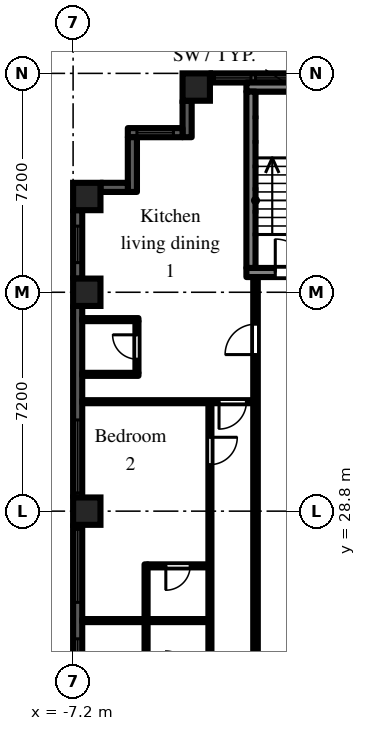
"""IFC4 building model, lengths in metres.
Left out: names, types, materials, properties, quantities, classifications, styles, units other than length and angle.
Written with IfcOpenShell. Run it as: python <this file> out.ifc"""

import sys

from ifc_helpers import new_model, si_unit, direction, frame, frame_2d, origin, origin_2d, place, context, subcontext, project, spatial, rectangle, extrude, element, fill, save


model = new_model("IFC4")
c1 = context("Model", 3, precision=1e-05, world=origin(), true_north=direction((0.0, 1.0)))
c2 = subcontext(c1, "Body", "Model", "MODEL_VIEW")
j1 = project(units=[si_unit("LENGTHUNIT", "METRE"), si_unit("PLANEANGLEUNIT", "RADIAN")], contexts=[c1])
p1 = place(None, origin())
s1 = spatial("IfcSite", under=j1, at=p1, CompositionType="ELEMENT")
p2 = place(p1, origin())
s2 = spatial("IfcBuilding", under=s1, at=p2, CompositionType="ELEMENT")
p3 = place(p2, frame((0.0, 0.0, 20.7)))
s3 = spatial("IfcBuildingStorey", under=s2, at=p3, CompositionType="ELEMENT", Elevation=20.7)
for number, where, z_axis, x_axis in (
    (1, (-6.75, 28.8, 0.0), (0.0, 0.0, 1.0), (1.0, 0.0, 0.0)),
    (2, (-6.75, 36.0, 0.0), (0.0, 0.0, 1.0), (1.0, 0.0, 0.0)),
    (3, (-6.75, 39.15, 0.0), (0.0, 0.0, 1.0), (1.0, 0.0, 0.0)),
    (4, (-3.15, 42.75, 0.0), (0.0, 0.0, 1.0), (1.0, 0.0, 0.0)),
):
    element("IfcColumn", number, at=place(p3, frame(where, z_axis=z_axis, x_axis=x_axis)), inside=s3, PredefinedType="COLUMN", context=c2, shape_type="SweptSolid", body=[
        extrude(rectangle(XDim=0.9, YDim=0.9, at=origin_2d()), origin(), (0.0, 0.0, 1.0), 3.0),
    ])
p4 = place(p3, frame((2.7, 43.05, 0.0), z_axis=(0.0, 0.0, 1.0), x_axis=(-1.0, 0.0, 0.0)))
e5 = element("IfcWall", 5, at=p4, inside=s3, PredefinedType="SOLIDWALL", context=c2, shape_type="SweptSolid", body=[
    extrude(rectangle(XDim=5.4, YDim=0.3, at=frame_2d((2.7, 0.0))), origin(), (0.0, 0.0, 1.0), 2.1),
])
p5 = place(p4, frame((1.5, 0.0, 0.2)))
e6 = element("IfcOpeningElement", 6, at=p5, cuts=e5, PredefinedType="OPENING", context=c2, shape_type="SweptSolid", body=[
    extrude(rectangle(XDim=2.4, YDim=1.85, at=frame_2d((1.2, 0.925))), frame((0.0, 0.16, 0.0), z_axis=(0.0, -1.0, 0.0), x_axis=(1.0, 0.0, 0.0)), (0.0, 0.0, 1.0), 0.32),
])
p6 = place(p4, frame((0.15, 0.0, 0.2)))
e7 = element("IfcOpeningElement", 7, at=p6, cuts=e5, PredefinedType="OPENING", context=c2, shape_type="SweptSolid", body=[
    extrude(rectangle(XDim=1.2, YDim=1.85, at=frame_2d((0.6, 0.925))), frame((0.0, 0.16, 0.0), z_axis=(0.0, -1.0, 0.0), x_axis=(1.0, 0.0, 0.0)), (0.0, 0.0, 1.0), 0.32),
])
p7 = place(p4, frame((4.05, 0.0, 0.2)))
e8 = element("IfcOpeningElement", 8, at=p7, cuts=e5, PredefinedType="OPENING", context=c2, shape_type="SweptSolid", body=[
    extrude(rectangle(XDim=1.2, YDim=1.85, at=frame_2d((0.6, 0.925))), frame((0.0, 0.16, 0.0), z_axis=(0.0, -1.0, 0.0), x_axis=(1.0, 0.0, 0.0)), (0.0, 0.0, 1.0), 0.32),
])
p8 = place(p3, frame((-3.45, 42.3, 0.0), z_axis=(0.0, 0.0, 1.0), x_axis=(0.0, -1.0, 0.0)))
e9 = element("IfcWall", 9, at=p8, inside=s3, PredefinedType="SOLIDWALL", context=c2, shape_type="SweptSolid", body=[
    extrude(rectangle(XDim=1.2, YDim=0.3, at=frame_2d((0.6, 0.0))), origin(), (0.0, 0.0, 1.0), 2.575),
])
p9 = place(p3, frame((-3.6, 41.25, 0.0), z_axis=(0.0, 0.0, 1.0), x_axis=(-1.0, 0.0, 0.0)))
e10 = element("IfcWall", 10, at=p9, inside=s3, PredefinedType="SOLIDWALL", context=c2, shape_type="SweptSolid", body=[
    extrude(rectangle(XDim=1.8, YDim=0.3, at=frame_2d((0.9, 0.0))), origin(), (0.0, 0.0, 1.0), 2.575),
])
p10 = place(p9, frame((0.3, 0.0, 0.2)))
e11 = element("IfcOpeningElement", 11, at=p10, cuts=e10, PredefinedType="OPENING", context=c2, shape_type="SweptSolid", body=[
    extrude(rectangle(XDim=1.2, YDim=1.85, at=frame_2d((0.6, 0.925))), frame((0.0, 0.16, 0.0), z_axis=(0.0, -1.0, 0.0), x_axis=(1.0, 0.0, 0.0)), (0.0, 0.0, 1.0), 0.32),
])
p11 = place(p3, frame((-5.25, 41.1, 0.0), z_axis=(0.0, 0.0, 1.0), x_axis=(0.0, -1.0, 0.0)))
e12 = element("IfcWall", 12, at=p11, inside=s3, PredefinedType="SOLIDWALL", context=c2, shape_type="SweptSolid", body=[
    extrude(rectangle(XDim=1.8, YDim=0.3, at=frame_2d((0.9, 0.0))), origin(), (0.0, 0.0, 1.0), 2.575),
])
p12 = place(p3, frame((-5.4, 39.45, 0.0), z_axis=(0.0, 0.0, 1.0), x_axis=(-1.0, 0.0, 0.0)))
e13 = element("IfcWall", 13, at=p12, inside=s3, PredefinedType="SOLIDWALL", context=c2, shape_type="SweptSolid", body=[
    extrude(rectangle(XDim=0.9, YDim=0.3, at=frame_2d((0.45, 0.0))), origin(), (0.0, 0.0, 1.0), 2.575),
])
p13 = place(p3, frame((-7.05, 38.7, 0.0), z_axis=(0.0, 0.0, 1.0), x_axis=(0.0, -1.0, 0.0)))
e14 = element("IfcWall", 14, at=p13, inside=s3, PredefinedType="SOLIDWALL", context=c2, shape_type="SweptSolid", body=[
    extrude(rectangle(XDim=2.25, YDim=0.3, at=frame_2d((1.125, 0.0))), origin(), (0.0, 0.0, 1.0), 2.1),
])
p14 = place(p13, frame((0.525, 0.0, 0.2)))
e15 = element("IfcOpeningElement", 15, at=p14, cuts=e14, PredefinedType="OPENING", context=c2, shape_type="SweptSolid", body=[
    extrude(rectangle(XDim=1.2, YDim=1.85, at=frame_2d((0.6, 0.925))), frame((0.0, 0.16, 0.0), z_axis=(0.0, -1.0, 0.0), x_axis=(1.0, 0.0, 0.0)), (0.0, 0.0, 1.0), 0.32),
])
p15 = place(p3, frame((-7.05, 35.55, 0.0), z_axis=(0.0, 0.0, 1.0), x_axis=(0.0, -1.0, 0.0)))
e16 = element("IfcWall", 16, at=p15, inside=s3, PredefinedType="SOLIDWALL", context=c2, shape_type="SweptSolid", body=[
    extrude(rectangle(XDim=6.3, YDim=0.3, at=frame_2d((3.15, 0.0))), origin(), (0.0, 0.0, 1.0), 2.1),
])
p16 = place(p15, frame((3.75, 0.0, 0.2)))
e17 = element("IfcOpeningElement", 17, at=p16, cuts=e16, PredefinedType="OPENING", context=c2, shape_type="SweptSolid", body=[
    extrude(rectangle(XDim=2.4, YDim=1.85, at=frame_2d((1.2, 0.925))), frame((0.0, 0.16, 0.0), z_axis=(0.0, -1.0, 0.0), x_axis=(1.0, 0.0, 0.0)), (0.0, 0.0, 1.0), 0.32),
])
p17 = place(p3, frame((-7.05, 28.35, 0.0), z_axis=(0.0, 0.0, 1.0), x_axis=(0.0, -1.0, 0.0)))
e18 = element("IfcWall", 18, at=p17, inside=s3, PredefinedType="SOLIDWALL", context=c2, shape_type="SweptSolid", body=[
    extrude(rectangle(XDim=6.3, YDim=0.3, at=frame_2d((3.15, 0.0))), origin(), (0.0, 0.0, 1.0), 2.1),
])
p18 = place(p17, frame((0.15, 0.0, 0.2)))
e19 = element("IfcOpeningElement", 19, at=p18, cuts=e18, PredefinedType="OPENING", context=c2, shape_type="SweptSolid", body=[
    extrude(rectangle(XDim=2.4, YDim=1.85, at=frame_2d((1.2, 0.925))), frame((0.0, 0.16, 0.0), z_axis=(0.0, -1.0, 0.0), x_axis=(1.0, 0.0, 0.0)), (0.0, 0.0, 1.0), 0.32),
])
p19 = place(p17, frame((3.75, 0.0, 0.2)))
e20 = element("IfcOpeningElement", 20, at=p19, cuts=e18, PredefinedType="OPENING", context=c2, shape_type="SweptSolid", body=[
    extrude(rectangle(XDim=2.4, YDim=1.85, at=frame_2d((1.2, 0.925))), frame((0.0, 0.16, 0.0), z_axis=(0.0, -1.0, 0.0), x_axis=(1.0, 0.0, 0.0)), (0.0, 0.0, 1.0), 0.32),
])
p20 = place(p3, frame((-1.5, 36.65, 0.0), z_axis=(0.0, 0.0, 1.0), x_axis=(1.0, 0.0, 0.0)))
e21 = element("IfcWall", 21, at=p20, inside=s3, PredefinedType="SHEAR", context=c2, shape_type="SweptSolid", body=[
    extrude(rectangle(XDim=3.0, YDim=0.3, at=frame_2d((1.5, 0.0))), origin(), (0.0, 0.0, 1.0), 2.575),
])
p21 = place(p20, frame((0.95, 0.0, 0.0)))
e22 = element("IfcOpeningElement", 22, at=p21, cuts=e21, PredefinedType="OPENING", context=c2, shape_type="SweptSolid", body=[
    extrude(rectangle(XDim=1.1, YDim=2.1, at=frame_2d((0.55, 1.05))), frame((0.0, 0.16, 0.0), z_axis=(0.0, -1.0, 0.0), x_axis=(1.0, 0.0, 0.0)), (0.0, 0.0, 1.0), 0.32),
])
p22 = place(p3, frame((-1.5, 42.75, 0.0), z_axis=(0.0, 0.0, 1.0), x_axis=(1.0, 0.0, 0.0)))
e23 = element("IfcWall", 23, at=p22, inside=s3, PredefinedType="SHEAR", context=c2, shape_type="SweptSolid", body=[
    extrude(rectangle(XDim=3.0, YDim=0.3, at=frame_2d((1.5, 0.0))), origin(), (0.0, 0.0, 1.0), 2.575),
])
p23 = place(p3, frame((-1.35, 36.8, 0.0), z_axis=(0.0, 0.0, 1.0), x_axis=(0.0, 1.0, 0.0)))
e24 = element("IfcWall", 24, at=p23, inside=s3, PredefinedType="SHEAR", context=c2, shape_type="SweptSolid", body=[
    extrude(rectangle(XDim=5.8, YDim=0.3, at=frame_2d((2.9, 0.0))), origin(), (0.0, 0.0, 1.0), 2.575),
])
p24 = place(p3, frame((-6.9, 25.2, 0.0), z_axis=(0.0, 0.0, 1.0), x_axis=(1.0, 0.0, 0.0)))
e25 = element("IfcWall", 25, at=p24, inside=s3, PredefinedType="PARTITIONING", context=c2, shape_type="SweptSolid", body=[
    extrude(rectangle(XDim=4.15, YDim=0.1, at=frame_2d((2.075, 0.0))), origin(), (0.0, 0.0, 1.0), 2.575),
])
p25 = place(p3, frame((-6.9, 32.4, 0.0), z_axis=(0.0, 0.0, 1.0), x_axis=(1.0, 0.0, 0.0)))
e26 = element("IfcWall", 26, at=p25, inside=s3, PredefinedType="PARTITIONING", context=c2, shape_type="SweptSolid", body=[
    extrude(rectangle(XDim=5.625, YDim=0.1, at=frame_2d((2.812, 0.0))), origin(), (0.0, 0.0, 1.0), 2.575),
])
p26 = place(p25, frame((4.5, 0.0, 0.0)))
e27 = element("IfcOpeningElement", 27, at=p26, cuts=e26, PredefinedType="OPENING", context=c2, shape_type="SweptSolid", body=[
    extrude(rectangle(XDim=0.9, YDim=2.1, at=frame_2d((0.45, 1.05))), frame((0.0, 0.06, 0.0), z_axis=(0.0, -1.0, 0.0), x_axis=(1.0, 0.0, 0.0)), (0.0, 0.0, 1.0), 0.12),
])
for number, where, z_axis, x_axis in (
    (28, (-6.9, 33.3, 0.0), (0.0, 0.0, 1.0), (1.0, 0.0, 0.0)),
    (29, (-6.9, 35.1, 0.0), (0.0, 0.0, 1.0), (1.0, 0.0, 0.0)),
):
    element("IfcWall", number, at=place(p3, frame(where, z_axis=z_axis, x_axis=x_axis)), inside=s3, PredefinedType="PARTITIONING", context=c2, shape_type="SweptSolid", body=[
        extrude(rectangle(XDim=1.85, YDim=0.1, at=frame_2d((0.925, 0.0))), origin(), (0.0, 0.0, 1.0), 2.575),
    ])
p27 = place(p3, frame((-5.1, 33.35, 0.0), z_axis=(0.0, 0.0, 1.0), x_axis=(0.0, 1.0, 0.0)))
e30 = element("IfcWall", 30, at=p27, inside=s3, PredefinedType="PARTITIONING", context=c2, shape_type="SweptSolid", body=[
    extrude(rectangle(XDim=1.7, YDim=0.1, at=frame_2d((0.85, 0.0))), origin(), (0.0, 0.0, 1.0), 2.575),
])
p28 = place(p27, frame((0.45, 0.0, 0.0)))
e31 = element("IfcOpeningElement", 31, at=p28, cuts=e30, PredefinedType="OPENING", context=c2, shape_type="SweptSolid", body=[
    extrude(rectangle(XDim=0.8, YDim=2.1, at=frame_2d((0.4, 1.05))), frame((0.0, 0.06, 0.0), z_axis=(0.0, -1.0, 0.0), x_axis=(1.0, 0.0, 0.0)), (0.0, 0.0, 1.0), 0.12),
])
p29 = place(p3, frame((-4.8, 23.35, 0.0), z_axis=(0.0, 0.0, 1.0), x_axis=(0.0, 1.0, 0.0)))
e32 = element("IfcWall", 32, at=p29, inside=s3, PredefinedType="PARTITIONING", context=c2, shape_type="SweptSolid", body=[
    extrude(rectangle(XDim=3.7, YDim=0.1, at=frame_2d((1.85, 0.0))), origin(), (0.0, 0.0, 1.0), 2.575),
])
p30 = place(p3, frame((-4.75, 27.0, 0.0), z_axis=(0.0, 0.0, 1.0), x_axis=(1.0, 0.0, 0.0)))
e33 = element("IfcWall", 33, at=p30, inside=s3, PredefinedType="PARTITIONING", context=c2, shape_type="SweptSolid", body=[
    extrude(rectangle(XDim=2.0, YDim=0.1, at=frame_2d((1.0, 0.0))), origin(), (0.0, 0.0, 1.0), 2.575),
])
p31 = place(p30, frame((0.6, 0.0, 0.0)))
e34 = element("IfcOpeningElement", 34, at=p31, cuts=e33, PredefinedType="OPENING", context=c2, shape_type="SweptSolid", body=[
    extrude(rectangle(XDim=0.8, YDim=2.1, at=frame_2d((0.4, 1.05))), frame((0.0, 0.06, 0.0), z_axis=(0.0, -1.0, 0.0), x_axis=(1.0, 0.0, 0.0)), (0.0, 0.0, 1.0), 0.12),
])
p32 = place(p3, frame((-2.7, 18.05, 0.0), z_axis=(0.0, 0.0, 1.0), x_axis=(0.0, 1.0, 0.0)))
e35 = element("IfcWall", 35, at=p32, inside=s3, PredefinedType="PARTITIONING", context=c2, shape_type="SweptSolid", body=[
    extrude(rectangle(XDim=14.3, YDim=0.1, at=frame_2d((7.15, 0.0))), origin(), (0.0, 0.0, 1.0), 2.575),
])
p33 = place(p32, frame((1.12, 0.0, 0.0)))
e36 = element("IfcOpeningElement", 36, at=p33, cuts=e35, PredefinedType="OPENING", context=c2, shape_type="SweptSolid", body=[
    extrude(rectangle(XDim=0.9, YDim=2.1, at=frame_2d((0.45, 1.05))), frame((0.0, 0.06, 0.0), z_axis=(0.0, -1.0, 0.0), x_axis=(1.0, 0.0, 0.0)), (0.0, 0.0, 1.0), 0.12),
])
p34 = place(p32, frame((12.28, 0.0, 0.0)))
e37 = element("IfcOpeningElement", 37, at=p34, cuts=e35, PredefinedType="OPENING", context=c2, shape_type="SweptSolid", body=[
    extrude(rectangle(XDim=0.9, YDim=2.1, at=frame_2d((0.45, 1.05))), frame((0.0, 0.06, 0.0), z_axis=(0.0, -1.0, 0.0), x_axis=(1.0, 0.0, 0.0)), (0.0, 0.0, 1.0), 0.12),
])
p35 = place(p3, frame((-1.2, 1.275, 0.0), z_axis=(0.0, 0.0, 1.0), x_axis=(0.0, 1.0, 0.0)))
e38 = element("IfcWall", 38, at=p35, inside=s3, PredefinedType="PARTITIONING", context=c2, shape_type="SweptSolid", body=[
    extrude(rectangle(XDim=35.225, YDim=0.15, at=frame_2d((17.613, 0.0))), origin(), (0.0, 0.0, 1.0), 2.575),
])
p36 = place(p35, frame((0.675, 0.0, 0.0)))
e39 = element("IfcOpeningElement", 39, at=p36, cuts=e38, PredefinedType="OPENING", context=c2, shape_type="SweptSolid", body=[
    extrude(rectangle(XDim=0.9, YDim=2.1, at=frame_2d((0.45, 1.05))), frame((0.0, 0.085, 0.0), z_axis=(0.0, -1.0, 0.0), x_axis=(1.0, 0.0, 0.0)), (0.0, 0.0, 1.0), 0.17),
])
p37 = place(p35, frame((3.675, 0.0, 0.0)))
e40 = element("IfcOpeningElement", 40, at=p37, cuts=e38, PredefinedType="OPENING", context=c2, shape_type="SweptSolid", body=[
    extrude(rectangle(XDim=0.9, YDim=2.1, at=frame_2d((0.45, 1.05))), frame((0.0, 0.085, 0.0), z_axis=(0.0, -1.0, 0.0), x_axis=(1.0, 0.0, 0.0)), (0.0, 0.0, 1.0), 0.17),
])
p38 = place(p35, frame((11.275, 0.0, 0.0)))
e41 = element("IfcOpeningElement", 41, at=p38, cuts=e38, PredefinedType="OPENING", context=c2, shape_type="SweptSolid", body=[
    extrude(rectangle(XDim=0.9, YDim=2.1, at=frame_2d((0.45, 1.05))), frame((0.0, 0.085, 0.0), z_axis=(0.0, -1.0, 0.0), x_axis=(1.0, 0.0, 0.0)), (0.0, 0.0, 1.0), 0.17),
])
p39 = place(p35, frame((7.675, 0.0, 0.0)))
e42 = element("IfcOpeningElement", 42, at=p39, cuts=e38, PredefinedType="OPENING", context=c2, shape_type="SweptSolid", body=[
    extrude(rectangle(XDim=0.9, YDim=2.1, at=frame_2d((0.45, 1.05))), frame((0.0, 0.085, 0.0), z_axis=(0.0, -1.0, 0.0), x_axis=(1.0, 0.0, 0.0)), (0.0, 0.0, 1.0), 0.17),
])
p40 = place(p35, frame((14.475, 0.0, 0.0)))
e43 = element("IfcOpeningElement", 43, at=p40, cuts=e38, PredefinedType="OPENING", context=c2, shape_type="SweptSolid", body=[
    extrude(rectangle(XDim=0.9, YDim=2.1, at=frame_2d((0.45, 1.05))), frame((0.0, 0.085, 0.0), z_axis=(0.0, -1.0, 0.0), x_axis=(1.0, 0.0, 0.0)), (0.0, 0.0, 1.0), 0.17),
])
p41 = place(p35, frame((32.675, 0.0, 0.0)))
e44 = element("IfcOpeningElement", 44, at=p41, cuts=e38, PredefinedType="OPENING", context=c2, shape_type="SweptSolid", body=[
    extrude(rectangle(XDim=1.0, YDim=2.1, at=frame_2d((0.5, 1.05))), frame((0.0, 0.085, 0.0), z_axis=(0.0, -1.0, 0.0), x_axis=(1.0, 0.0, 0.0)), (0.0, 0.0, 1.0), 0.17),
])
p42 = place(p5, origin())
e45 = element("IfcWindow", 45, at=p42, inside=s3, PartitioningType="SINGLE_PANEL", PredefinedType="WINDOW", context=c2, shape_type="SweptSolid", body=[
    extrude(rectangle(XDim=2.4, YDim=1.85, at=frame_2d((1.2, 0.925))), frame((0.0, 0.03, 0.0), z_axis=(0.0, -1.0, 0.0), x_axis=(1.0, 0.0, 0.0)), (0.0, 0.0, 1.0), 0.06),
])
fill(e6, e45)
p43 = place(p7, origin())
e46 = element("IfcWindow", 46, at=p43, inside=s3, PartitioningType="SINGLE_PANEL", PredefinedType="WINDOW", context=c2, shape_type="SweptSolid", body=[
    extrude(rectangle(XDim=1.2, YDim=1.85, at=frame_2d((0.6, 0.925))), frame((0.0, 0.03, 0.0), z_axis=(0.0, -1.0, 0.0), x_axis=(1.0, 0.0, 0.0)), (0.0, 0.0, 1.0), 0.06),
])
fill(e8, e46)
p44 = place(p10, origin())
e47 = element("IfcWindow", 47, at=p44, inside=s3, PartitioningType="SINGLE_PANEL", PredefinedType="WINDOW", context=c2, shape_type="SweptSolid", body=[
    extrude(rectangle(XDim=1.2, YDim=1.85, at=frame_2d((0.6, 0.925))), frame((0.0, 0.03, 0.0), z_axis=(0.0, -1.0, 0.0), x_axis=(1.0, 0.0, 0.0)), (0.0, 0.0, 1.0), 0.06),
])
fill(e11, e47)
p45 = place(p14, origin())
e48 = element("IfcWindow", 48, at=p45, inside=s3, PartitioningType="SINGLE_PANEL", PredefinedType="WINDOW", context=c2, shape_type="SweptSolid", body=[
    extrude(rectangle(XDim=1.2, YDim=1.85, at=frame_2d((0.6, 0.925))), frame((0.0, 0.03, 0.0), z_axis=(0.0, -1.0, 0.0), x_axis=(1.0, 0.0, 0.0)), (0.0, 0.0, 1.0), 0.06),
])
fill(e15, e48)
p46 = place(p16, origin())
e49 = element("IfcWindow", 49, at=p46, inside=s3, PartitioningType="SINGLE_PANEL", PredefinedType="WINDOW", context=c2, shape_type="SweptSolid", body=[
    extrude(rectangle(XDim=2.4, YDim=1.85, at=frame_2d((1.2, 0.925))), frame((0.0, 0.03, 0.0), z_axis=(0.0, -1.0, 0.0), x_axis=(1.0, 0.0, 0.0)), (0.0, 0.0, 1.0), 0.06),
])
fill(e17, e49)
p47 = place(p18, origin())
e50 = element("IfcWindow", 50, at=p47, inside=s3, PartitioningType="SINGLE_PANEL", PredefinedType="WINDOW", context=c2, shape_type="SweptSolid", body=[
    extrude(rectangle(XDim=2.4, YDim=1.85, at=frame_2d((1.2, 0.925))), frame((0.0, 0.03, 0.0), z_axis=(0.0, -1.0, 0.0), x_axis=(1.0, 0.0, 0.0)), (0.0, 0.0, 1.0), 0.06),
])
fill(e19, e50)
p48 = place(p19, origin())
e51 = element("IfcWindow", 51, at=p48, inside=s3, PartitioningType="SINGLE_PANEL", PredefinedType="WINDOW", context=c2, shape_type="SweptSolid", body=[
    extrude(rectangle(XDim=2.4, YDim=1.85, at=frame_2d((1.2, 0.925))), frame((0.0, 0.03, 0.0), z_axis=(0.0, -1.0, 0.0), x_axis=(1.0, 0.0, 0.0)), (0.0, 0.0, 1.0), 0.06),
])
fill(e20, e51)
p49 = place(p21, origin())
e52 = element("IfcDoor", 52, at=p49, inside=s3, OperationType="SINGLE_SWING_LEFT", PredefinedType="DOOR", context=c2, shape_type="SweptSolid", body=[
    extrude(rectangle(XDim=1.1, YDim=2.1, at=frame_2d((0.55, 1.05))), frame((0.0, 0.025, 0.0), z_axis=(0.0, -1.0, 0.0), x_axis=(1.0, 0.0, 0.0)), (0.0, 0.0, 1.0), 0.05),
])
fill(e22, e52)
p50 = place(p28, origin())
e53 = element("IfcDoor", 53, at=p50, inside=s3, OperationType="SINGLE_SWING_RIGHT", PredefinedType="DOOR", context=c2, shape_type="SweptSolid", body=[
    extrude(rectangle(XDim=0.8, YDim=2.1, at=frame_2d((0.4, 1.05))), frame((0.0, 0.025, 0.0), z_axis=(0.0, -1.0, 0.0), x_axis=(1.0, 0.0, 0.0)), (0.0, 0.0, 1.0), 0.05),
])
fill(e31, e53)
p51 = place(p41, origin())
e54 = element("IfcDoor", 54, at=p51, inside=s3, OperationType="SINGLE_SWING_LEFT", PredefinedType="DOOR", context=c2, shape_type="SweptSolid", body=[
    extrude(rectangle(XDim=1.0, YDim=2.1, at=frame_2d((0.5, 1.05))), frame((0.0, 0.025, 0.0), z_axis=(0.0, -1.0, 0.0), x_axis=(1.0, 0.0, 0.0)), (0.0, 0.0, 1.0), 0.05),
])
fill(e44, e54)
p52 = place(p34, frame((0.9, 0.0, 0.0), z_axis=(0.0, 0.0, 1.0), x_axis=(-1.0, 0.0, 0.0)))
e55 = element("IfcDoor", 55, at=p52, inside=s3, OperationType="SINGLE_SWING_LEFT", PredefinedType="DOOR", context=c2, shape_type="SweptSolid", body=[
    extrude(rectangle(XDim=0.9, YDim=2.1, at=frame_2d((0.45, 1.05))), frame((0.0, 0.025, 0.0), z_axis=(0.0, -1.0, 0.0), x_axis=(1.0, 0.0, 0.0)), (0.0, 0.0, 1.0), 0.05),
])
fill(e37, e55)
p53 = place(p26, frame((0.9, 0.0, 0.0), z_axis=(0.0, 0.0, 1.0), x_axis=(-1.0, 0.0, 0.0)))
e56 = element("IfcDoor", 56, at=p53, inside=s3, OperationType="SINGLE_SWING_RIGHT", PredefinedType="DOOR", context=c2, shape_type="SweptSolid", body=[
    extrude(rectangle(XDim=0.9, YDim=2.1, at=frame_2d((0.45, 1.05))), frame((0.0, 0.025, 0.0), z_axis=(0.0, -1.0, 0.0), x_axis=(1.0, 0.0, 0.0)), (0.0, 0.0, 1.0), 0.05),
])
fill(e27, e56)
p54 = place(p31, frame((0.8, 0.0, 0.0), z_axis=(0.0, 0.0, 1.0), x_axis=(-1.0, 0.0, 0.0)))
e57 = element("IfcDoor", 57, at=p54, inside=s3, OperationType="SINGLE_SWING_RIGHT", PredefinedType="DOOR", context=c2, shape_type="SweptSolid", body=[
    extrude(rectangle(XDim=0.8, YDim=2.1, at=frame_2d((0.4, 1.05))), frame((0.0, 0.025, 0.0), z_axis=(0.0, -1.0, 0.0), x_axis=(1.0, 0.0, 0.0)), (0.0, 0.0, 1.0), 0.05),
])
fill(e34, e57)
save(model, sys.argv[1])
